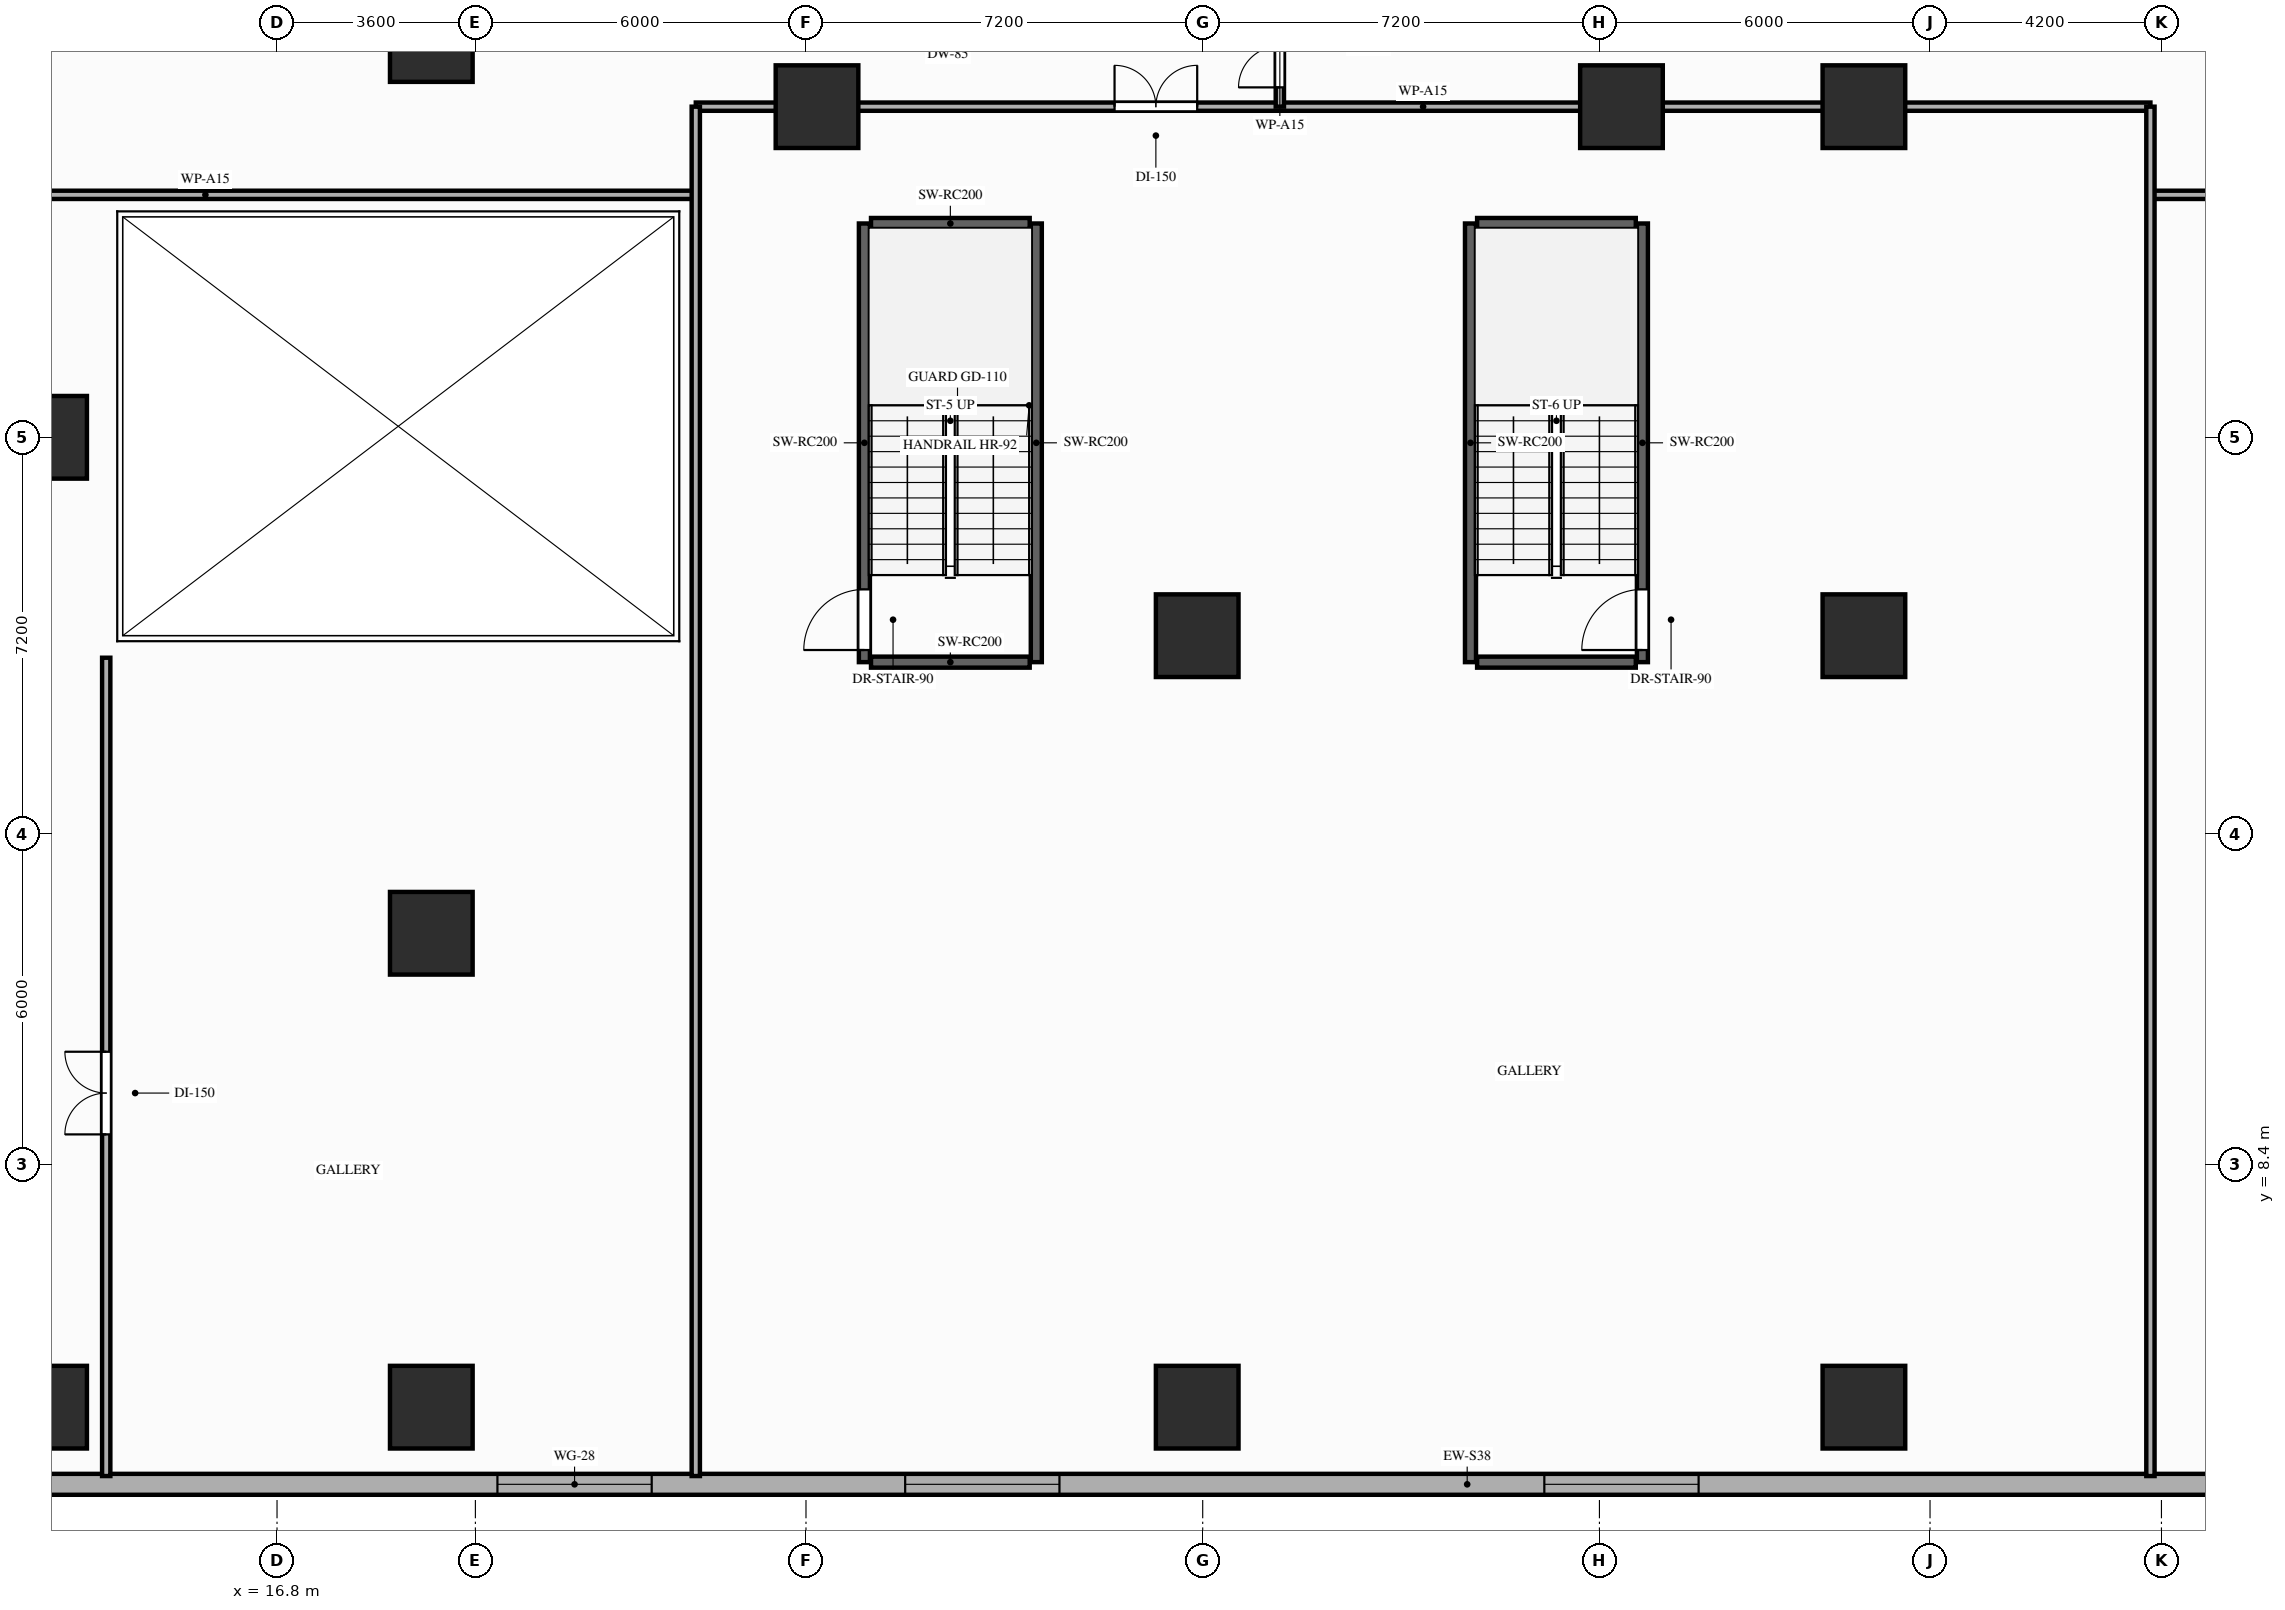
"""IFC4 building model, lengths in metres.
Left out: names, types, materials, properties, quantities, classifications, styles, units other than length and angle.
Written with IfcOpenShell. Run it as: python <this file> out.ifc"""

import sys

from ifc_helpers import new_model, si_unit, direction, frame, frame_2d, origin, origin_2d, place, context, subcontext, project, spatial, rectangle, extrude, element, fill, save


model = new_model("IFC4")
c1 = context("Model", 3, precision=1e-05, world=origin(), true_north=direction((0.0, 1.0)))
c2 = subcontext(c1, "Body", "Model", "MODEL_VIEW")
j1 = project(units=[si_unit("LENGTHUNIT", "METRE"), si_unit("PLANEANGLEUNIT", "RADIAN")], contexts=[c1])
p1 = place(None, origin())
s1 = spatial("IfcSite", under=j1, at=p1, CompositionType="ELEMENT")
p2 = place(p1, origin())
s2 = spatial("IfcBuilding", under=s1, at=p2, CompositionType="ELEMENT")
p3 = place(p2, frame((0.0, 0.0, 8.8)))
s3 = spatial("IfcBuildingStorey", under=s2, at=p3, CompositionType="ELEMENT", Elevation=8.8)
for number, where, z_axis, x_axis in (
    (1, (19.6, 12.6, 0.0), (0.0, 0.0, 1.0), (1.0, 0.0, 0.0)),
    (2, (19.6, 28.8, 0.0), (0.0, 0.0, 1.0), (1.0, 0.0, 0.0)),
    (3, (26.6, 27.6, 0.0), (0.0, 0.0, 1.0), (1.0, 0.0, 0.0)),
    (4, (41.2, 27.6, 0.0), (0.0, 0.0, 1.0), (1.0, 0.0, 0.0)),
    (5, (45.6, 27.6, 0.0), (0.0, 0.0, 1.0), (1.0, 0.0, 0.0)),
    (6, (12.6, 4.0, 0.0), (0.0, 0.0, 1.0), (1.0, 0.0, 0.0)),
    (7, (19.6, 4.0, 0.0), (0.0, 0.0, 1.0), (1.0, 0.0, 0.0)),
    (8, (33.5, 4.0, 0.0), (0.0, 0.0, 1.0), (1.0, 0.0, 0.0)),
    (9, (45.6, 4.0, 0.0), (0.0, 0.0, 1.0), (1.0, 0.0, 0.0)),
    (10, (12.6, 21.6, 0.0), (0.0, 0.0, 1.0), (1.0, 0.0, 0.0)),
    (11, (33.5, 18.0, 0.0), (0.0, 0.0, 1.0), (1.0, 0.0, 0.0)),
    (12, (45.6, 18.0, 0.0), (0.0, 0.0, 1.0), (1.0, 0.0, 0.0)),
):
    element("IfcColumn", number, at=place(p3, frame(where, z_axis=z_axis, x_axis=x_axis)), inside=s3, PredefinedType="COLUMN", context=c2, shape_type="SweptSolid", body=[
        extrude(rectangle(XDim=1.5, YDim=1.5, at=origin_2d()), origin(), (0.0, 0.0, 1.0), 4.2),
    ])
p4 = place(p3, frame((3.6, 2.6, 0.0), z_axis=(0.0, 0.0, 1.0), x_axis=(1.0, 0.0, 0.0)))
e13 = element("IfcWall", 13, at=p4, inside=s3, PredefinedType="STANDARD", context=c2, shape_type="SweptSolid", body=[
    extrude(rectangle(XDim=69.6, YDim=0.38, at=frame_2d((34.8, 0.0))), origin(), (0.0, 0.0, 1.0), 3.95),
])
p5 = place(p4, frame((17.2, 0.0, 0.9)))
e14 = element("IfcOpeningElement", 14, at=p5, cuts=e13, PredefinedType="OPENING", context=c2, shape_type="SweptSolid", body=[
    extrude(rectangle(XDim=2.8, YDim=2.2, at=frame_2d((1.4, 1.1))), frame((0.0, 0.2, 0.0), z_axis=(0.0, -1.0, 0.0), x_axis=(1.0, 0.0, 0.0)), (0.0, 0.0, 1.0), 0.4),
])
p6 = place(p4, frame((24.6, 0.0, 0.9)))
e15 = element("IfcOpeningElement", 15, at=p6, cuts=e13, PredefinedType="OPENING", context=c2, shape_type="SweptSolid", body=[
    extrude(rectangle(XDim=2.8, YDim=2.2, at=frame_2d((1.4, 1.1))), frame((0.0, 0.2, 0.0), z_axis=(0.0, -1.0, 0.0), x_axis=(1.0, 0.0, 0.0)), (0.0, 0.0, 1.0), 0.4),
])
p7 = place(p4, frame((36.2, 0.0, 0.9)))
e16 = element("IfcOpeningElement", 16, at=p7, cuts=e13, PredefinedType="OPENING", context=c2, shape_type="SweptSolid", body=[
    extrude(rectangle(XDim=2.8, YDim=2.2, at=frame_2d((1.4, 1.1))), frame((0.0, 0.2, 0.0), z_axis=(0.0, -1.0, 0.0), x_axis=(1.0, 0.0, 0.0)), (0.0, 0.0, 1.0), 0.4),
])
p8 = place(p4, frame((48.4, 0.0, 0.9)))
e17 = element("IfcOpeningElement", 17, at=p8, cuts=e13, PredefinedType="OPENING", context=c2, shape_type="SweptSolid", body=[
    extrude(rectangle(XDim=2.8, YDim=2.2, at=frame_2d((1.4, 1.1))), frame((0.0, 0.2, 0.0), z_axis=(0.0, -1.0, 0.0), x_axis=(1.0, 0.0, 0.0)), (0.0, 0.0, 1.0), 0.4),
])
p9 = place(p4, frame((64.0, 0.0, 0.9)))
e18 = element("IfcOpeningElement", 18, at=p9, cuts=e13, PredefinedType="OPENING", context=c2, shape_type="SweptSolid", body=[
    extrude(rectangle(XDim=2.8, YDim=2.2, at=frame_2d((1.4, 1.1))), frame((0.0, 0.2, 0.0), z_axis=(0.0, -1.0, 0.0), x_axis=(1.0, 0.0, 0.0)), (0.0, 0.0, 1.0), 0.4),
])
p10 = place(p3, frame((27.46, 17.52, 0.0), z_axis=(0.0, 0.0, 1.0), x_axis=(0.0, 1.0, 0.0)))
e19 = element("IfcWall", 19, at=p10, inside=s3, PredefinedType="SHEAR", context=c2, shape_type="SweptSolid", body=[
    extrude(rectangle(XDim=7.96, YDim=0.2, at=frame_2d((3.98, 0.0))), origin(), (0.0, 0.0, 1.0), 3.95),
])
p11 = place(p10, frame((0.22, 0.0, 0.0)))
e20 = element("IfcOpeningElement", 20, at=p11, cuts=e19, PredefinedType="OPENING", context=c2, shape_type="SweptSolid", body=[
    extrude(rectangle(XDim=1.1, YDim=2.15, at=frame_2d((0.55, 1.075))), frame((0.0, 0.11, 0.0), z_axis=(0.0, -1.0, 0.0), x_axis=(1.0, 0.0, 0.0)), (0.0, 0.0, 1.0), 0.22),
])
p12 = place(p3, frame((30.58, 17.52, 0.0), z_axis=(0.0, 0.0, 1.0), x_axis=(0.0, 1.0, 0.0)))
e21 = element("IfcWall", 21, at=p12, inside=s3, PredefinedType="SHEAR", context=c2, shape_type="SweptSolid", body=[
    extrude(rectangle(XDim=7.96, YDim=0.2, at=frame_2d((3.98, 0.0))), origin(), (0.0, 0.0, 1.0), 3.95),
])
for number, where, z_axis, x_axis in (
    (22, (27.58, 25.48, 0.0), (0.0, 0.0, 1.0), (1.0, 0.0, 0.0)),
    (23, (27.58, 17.52, 0.0), (0.0, 0.0, 1.0), (1.0, 0.0, 0.0)),
):
    element("IfcWall", number, at=place(p3, frame(where, z_axis=z_axis, x_axis=x_axis)), inside=s3, PredefinedType="SHEAR", context=c2, shape_type="SweptSolid", body=[
        extrude(rectangle(XDim=2.88, YDim=0.2, at=frame_2d((1.44, 0.0))), origin(), (0.0, 0.0, 1.0), 3.95),
    ])
p13 = place(p3, frame((38.46, 17.52, 0.0), z_axis=(0.0, 0.0, 1.0), x_axis=(0.0, 1.0, 0.0)))
e24 = element("IfcWall", 24, at=p13, inside=s3, PredefinedType="SHEAR", context=c2, shape_type="SweptSolid", body=[
    extrude(rectangle(XDim=7.96, YDim=0.2, at=frame_2d((3.98, 0.0))), origin(), (0.0, 0.0, 1.0), 3.95),
])
p14 = place(p3, frame((41.58, 17.52, 0.0), z_axis=(0.0, 0.0, 1.0), x_axis=(0.0, 1.0, 0.0)))
e25 = element("IfcWall", 25, at=p14, inside=s3, PredefinedType="SHEAR", context=c2, shape_type="SweptSolid", body=[
    extrude(rectangle(XDim=7.96, YDim=0.2, at=frame_2d((3.98, 0.0))), origin(), (0.0, 0.0, 1.0), 3.95),
])
p15 = place(p14, frame((0.22, 0.0, 0.0)))
e26 = element("IfcOpeningElement", 26, at=p15, cuts=e25, PredefinedType="OPENING", context=c2, shape_type="SweptSolid", body=[
    extrude(rectangle(XDim=1.1, YDim=2.15, at=frame_2d((0.55, 1.075))), frame((0.0, 0.11, 0.0), z_axis=(0.0, -1.0, 0.0), x_axis=(1.0, 0.0, 0.0)), (0.0, 0.0, 1.0), 0.22),
])
for number, where, z_axis, x_axis in (
    (27, (38.58, 25.48, 0.0), (0.0, 0.0, 1.0), (1.0, 0.0, 0.0)),
    (28, (38.58, 17.52, 0.0), (0.0, 0.0, 1.0), (1.0, 0.0, 0.0)),
):
    element("IfcWall", number, at=place(p3, frame(where, z_axis=z_axis, x_axis=x_axis)), inside=s3, PredefinedType="SHEAR", context=c2, shape_type="SweptSolid", body=[
        extrude(rectangle(XDim=2.88, YDim=0.2, at=frame_2d((1.44, 0.0))), origin(), (0.0, 0.0, 1.0), 3.95),
    ])
p16 = place(p3, frame((6.6, 26.0, 0.0), z_axis=(0.0, 0.0, 1.0), x_axis=(1.0, 0.0, 0.0)))
e29 = element("IfcWall", 29, at=p16, inside=s3, PredefinedType="PARTITIONING", context=c2, shape_type="SweptSolid", body=[
    extrude(rectangle(XDim=17.8, YDim=0.15, at=frame_2d((8.9, 0.0))), origin(), (0.0, 0.0, 1.0), 3.13),
])
p17 = place(p3, frame((24.4, 27.6, 0.0), z_axis=(0.0, 0.0, 1.0), x_axis=(1.0, 0.0, 0.0)))
e30 = element("IfcWall", 30, at=p17, inside=s3, PredefinedType="PARTITIONING", context=c2, shape_type="SweptSolid", body=[
    extrude(rectangle(XDim=26.4, YDim=0.15, at=frame_2d((13.2, 0.0))), origin(), (0.0, 0.0, 1.0), 3.13),
])
p18 = place(p17, frame((7.6, 0.0, 0.0)))
e31 = element("IfcOpeningElement", 31, at=p18, cuts=e30, PredefinedType="OPENING", context=c2, shape_type="SweptSolid", body=[
    extrude(rectangle(XDim=1.5, YDim=2.18, at=frame_2d((0.75, 1.09))), frame((0.0, 0.085, 0.0), z_axis=(0.0, -1.0, 0.0), x_axis=(1.0, 0.0, 0.0)), (0.0, 0.0, 1.0), 0.17),
])
p19 = place(p3, frame((50.8, 26.0, 0.0), z_axis=(0.0, 0.0, 1.0), x_axis=(1.0, 0.0, 0.0)))
e32 = element("IfcWall", 32, at=p19, inside=s3, PredefinedType="PARTITIONING", context=c2, shape_type="SweptSolid", body=[
    extrude(rectangle(XDim=11.6, YDim=0.15, at=frame_2d((5.8, 0.0))), origin(), (0.0, 0.0, 1.0), 3.13),
])
p20 = place(p19, frame((3.7, 0.0, 0.0)))
e33 = element("IfcOpeningElement", 33, at=p20, cuts=e32, PredefinedType="OPENING", context=c2, shape_type="SweptSolid", body=[
    extrude(rectangle(XDim=1.5, YDim=2.18, at=frame_2d((0.75, 1.09))), frame((0.0, 0.085, 0.0), z_axis=(0.0, -1.0, 0.0), x_axis=(1.0, 0.0, 0.0)), (0.0, 0.0, 1.0), 0.17),
])
p21 = place(p3, frame((35.0, 27.6, 0.0), z_axis=(0.0, 0.0, 1.0), x_axis=(0.0, 1.0, 0.0)))
e34 = element("IfcWall", 34, at=p21, inside=s3, PredefinedType="PARTITIONING", context=c2, shape_type="SweptSolid", body=[
    extrude(rectangle(XDim=2.2, YDim=0.15, at=frame_2d((1.1, 0.0))), origin(), (0.0, 0.0, 1.0), 3.13),
])
p22 = place(p21, frame((0.35, 0.0, 0.0)))
e35 = element("IfcOpeningElement", 35, at=p22, cuts=e34, PredefinedType="OPENING", context=c2, shape_type="SweptSolid", body=[
    extrude(rectangle(XDim=1.5, YDim=2.18, at=frame_2d((0.75, 1.09))), frame((0.0, 0.085, 0.0), z_axis=(0.0, -1.0, 0.0), x_axis=(1.0, 0.0, 0.0)), (0.0, 0.0, 1.0), 0.17),
])
for number, where, z_axis, x_axis in (
    (36, (24.4, 2.75, 0.0), (0.0, 0.0, 1.0), (0.0, 1.0, 0.0)),
    (37, (50.8, 2.75, 0.0), (0.0, 0.0, 1.0), (0.0, 1.0, 0.0)),
):
    element("IfcWall", number, at=place(p3, frame(where, z_axis=z_axis, x_axis=x_axis)), inside=s3, PredefinedType="PARTITIONING", context=c2, shape_type="SweptSolid", body=[
        extrude(rectangle(XDim=24.85, YDim=0.15, at=frame_2d((12.425, 0.0))), origin(), (0.0, 0.0, 1.0), 3.13),
    ])
p23 = place(p3, frame((13.7, 2.75, 0.0), z_axis=(0.0, 0.0, 1.0), x_axis=(0.0, 1.0, 0.0)))
e38 = element("IfcWall", 38, at=p23, inside=s3, PredefinedType="PARTITIONING", context=c2, shape_type="SweptSolid", body=[
    extrude(rectangle(XDim=14.85, YDim=0.15, at=frame_2d((7.425, 0.0))), origin(), (0.0, 0.0, 1.0), 3.13),
])
p24 = place(p23, frame((6.2, 0.0, 0.0)))
e39 = element("IfcOpeningElement", 39, at=p24, cuts=e38, PredefinedType="OPENING", context=c2, shape_type="SweptSolid", body=[
    extrude(rectangle(XDim=1.5, YDim=2.18, at=frame_2d((0.75, 1.09))), frame((0.0, 0.085, 0.0), z_axis=(0.0, -1.0, 0.0), x_axis=(1.0, 0.0, 0.0)), (0.0, 0.0, 1.0), 0.17),
])
p25 = place(p5, origin())
e40 = element("IfcWindow", 40, at=p25, inside=s3, PartitioningType="SINGLE_PANEL", PredefinedType="WINDOW", context=c2, shape_type="SweptSolid", body=[
    extrude(rectangle(XDim=2.8, YDim=2.2, at=frame_2d((1.4, 1.1))), frame((0.0, 0.03, 0.0), z_axis=(0.0, -1.0, 0.0), x_axis=(1.0, 0.0, 0.0)), (0.0, 0.0, 1.0), 0.06),
])
fill(e14, e40)
p26 = place(p6, origin())
e41 = element("IfcWindow", 41, at=p26, inside=s3, PartitioningType="SINGLE_PANEL", PredefinedType="WINDOW", context=c2, shape_type="SweptSolid", body=[
    extrude(rectangle(XDim=2.8, YDim=2.2, at=frame_2d((1.4, 1.1))), frame((0.0, 0.03, 0.0), z_axis=(0.0, -1.0, 0.0), x_axis=(1.0, 0.0, 0.0)), (0.0, 0.0, 1.0), 0.06),
])
fill(e15, e41)
p27 = place(p7, origin())
e42 = element("IfcWindow", 42, at=p27, inside=s3, PartitioningType="SINGLE_PANEL", PredefinedType="WINDOW", context=c2, shape_type="SweptSolid", body=[
    extrude(rectangle(XDim=2.8, YDim=2.2, at=frame_2d((1.4, 1.1))), frame((0.0, 0.03, 0.0), z_axis=(0.0, -1.0, 0.0), x_axis=(1.0, 0.0, 0.0)), (0.0, 0.0, 1.0), 0.06),
])
fill(e16, e42)
p28 = place(p11, origin())
e43 = element("IfcDoor", 43, at=p28, inside=s3, OperationType="SINGLE_SWING_LEFT", PredefinedType="DOOR", context=c2, shape_type="SweptSolid", body=[
    extrude(rectangle(XDim=1.1, YDim=2.15, at=frame_2d((0.55, 1.075))), frame((0.0, 0.025, 0.0), z_axis=(0.0, -1.0, 0.0), x_axis=(1.0, 0.0, 0.0)), (0.0, 0.0, 1.0), 0.05),
])
fill(e20, e43)
p29 = place(p15, origin())
e44 = element("IfcDoor", 44, at=p29, inside=s3, OperationType="SINGLE_SWING_LEFT", PredefinedType="DOOR", context=c2, shape_type="SweptSolid", body=[
    extrude(rectangle(XDim=1.1, YDim=2.15, at=frame_2d((0.55, 1.075))), frame((0.0, 0.025, 0.0), z_axis=(0.0, -1.0, 0.0), x_axis=(1.0, 0.0, 0.0)), (0.0, 0.0, 1.0), 0.05),
])
fill(e26, e44)
p30 = place(p24, origin())
e45 = element("IfcDoor", 45, at=p30, inside=s3, OperationType="DOUBLE_DOOR_SINGLE_SWING", PredefinedType="DOOR", context=c2, shape_type="SweptSolid", body=[
    extrude(rectangle(XDim=1.5, YDim=2.18, at=frame_2d((0.75, 1.09))), frame((0.0, 0.025, 0.0), z_axis=(0.0, -1.0, 0.0), x_axis=(1.0, 0.0, 0.0)), (0.0, 0.0, 1.0), 0.05),
])
fill(e39, e45)
p31 = place(p22, origin())
e46 = element("IfcDoor", 46, at=p31, inside=s3, OperationType="DOUBLE_DOOR_SINGLE_SWING", PredefinedType="DOOR", context=c2, shape_type="SweptSolid", body=[
    extrude(rectangle(XDim=1.5, YDim=2.18, at=frame_2d((0.75, 1.09))), frame((0.0, 0.025, 0.0), z_axis=(0.0, -1.0, 0.0), x_axis=(1.0, 0.0, 0.0)), (0.0, 0.0, 1.0), 0.05),
])
fill(e35, e46)
p32 = place(p18, origin())
e47 = element("IfcDoor", 47, at=p32, inside=s3, OperationType="DOUBLE_DOOR_SINGLE_SWING", PredefinedType="DOOR", context=c2, shape_type="SweptSolid", body=[
    extrude(rectangle(XDim=1.5, YDim=2.18, at=frame_2d((0.75, 1.09))), frame((0.0, 0.025, 0.0), z_axis=(0.0, -1.0, 0.0), x_axis=(1.0, 0.0, 0.0)), (0.0, 0.0, 1.0), 0.05),
])
fill(e31, e47)
save(model, sys.argv[1])
